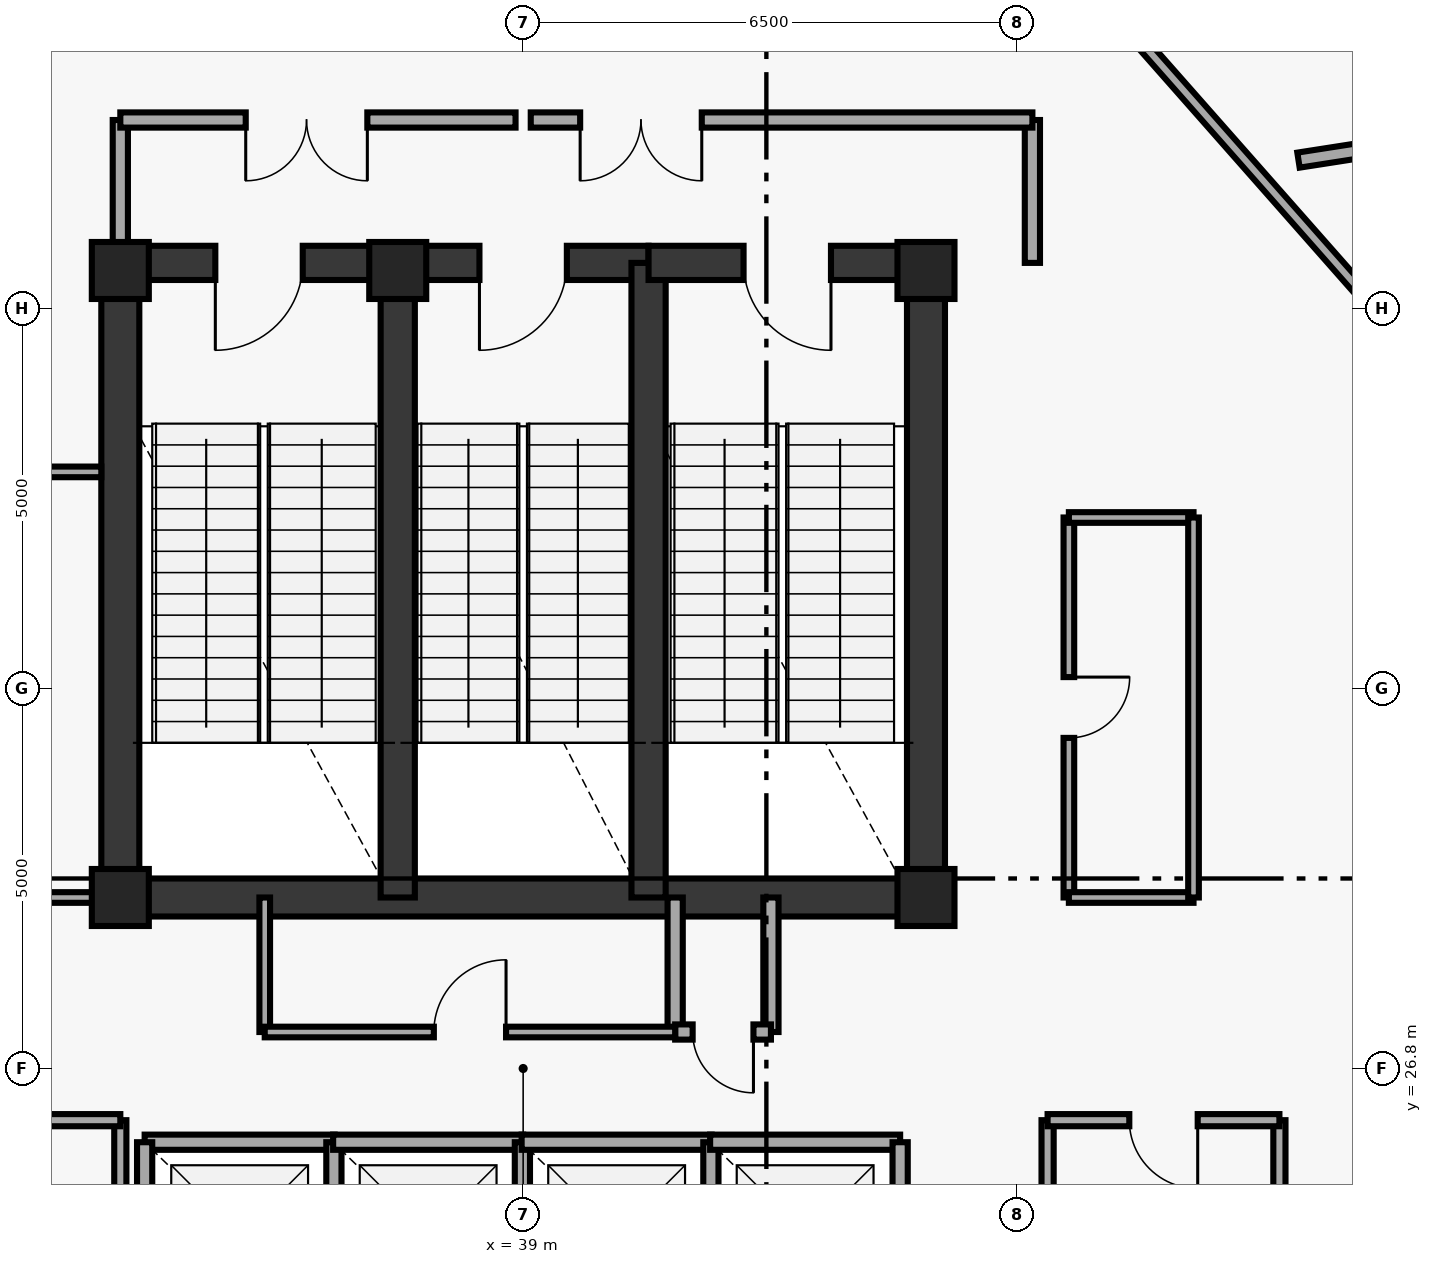
"""IFC4 building model, lengths in metres.
Left out: names, types, materials, properties, quantities, classifications, styles, units other than length and angle.
Written with IfcOpenShell. Run it as: python <this file> out.ifc"""

import sys

from ifc_helpers import new_model, si_unit, direction, frame, frame_2d, origin, origin_2d, place, context, subcontext, project, spatial, rectangle, extrude, element, fill, save


model = new_model("IFC4")
c1 = context("Model", 3, precision=1e-05, world=origin(), true_north=direction((0.0, 1.0)))
c2 = subcontext(c1, "Body", "Model", "MODEL_VIEW")
j1 = project(units=[si_unit("LENGTHUNIT", "METRE"), si_unit("PLANEANGLEUNIT", "RADIAN")], contexts=[c1])
p1 = place(None, origin())
s1 = spatial("IfcSite", under=j1, at=p1, CompositionType="ELEMENT")
p2 = place(p1, origin())
s2 = spatial("IfcBuilding", under=s1, at=p2, CompositionType="ELEMENT")
p3 = place(p2, frame((0.0, 0.0, 301.2)))
s3 = spatial("IfcBuildingStorey", under=s2, at=p3, CompositionType="ELEMENT", Elevation=301.2)
for number, where, z_axis, x_axis in (
    (1, (44.3, 29.05, 0.0), (0.0, 0.0, 1.0), (1.0, 0.0, 0.0)),
    (2, (44.3, 37.3, 0.0), (0.0, 0.0, 1.0), (1.0, 0.0, 0.0)),
    (3, (37.35, 37.3, 0.0), (0.0, 0.0, 1.0), (1.0, 0.0, 0.0)),
    (4, (33.7, 37.3, 0.0), (0.0, 0.0, 1.0), (1.0, 0.0, 0.0)),
    (5, (33.7, 29.05, 0.0), (0.0, 0.0, 1.0), (1.0, 0.0, 0.0)),
):
    element("IfcColumn", number, at=place(p3, frame(where, z_axis=z_axis, x_axis=x_axis)), inside=s3, PredefinedType="PILASTER", context=c2, shape_type="SweptSolid", body=[
        extrude(rectangle(XDim=0.75, YDim=0.75, at=origin_2d()), origin(), (0.0, 0.0, 1.0), 5.25),
    ])
for number, where, z_axis, x_axis in (
    (6, (33.7, 29.05, 0.0), (0.0, 0.0, 1.0), (0.0, 1.0, 0.0)),
    (7, (44.3, 29.05, 0.0), (0.0, 0.0, 1.0), (0.0, 1.0, 0.0)),
):
    element("IfcWall", number, at=place(p3, frame(where, z_axis=z_axis, x_axis=x_axis)), inside=s3, PredefinedType="SHEAR", context=c2, shape_type="SweptSolid", body=[
        extrude(rectangle(XDim=8.35, YDim=0.5, at=frame_2d((4.175, 0.0))), origin(), (0.0, 0.0, 1.0), 5.25),
    ])
p4 = place(p3, frame((33.7, 29.05, 0.0), z_axis=(0.0, 0.0, 1.0), x_axis=(1.0, 0.0, 0.0)))
e8 = element("IfcWall", 8, at=p4, inside=s3, PredefinedType="SHEAR", context=c2, shape_type="SweptSolid", body=[
    extrude(rectangle(XDim=10.6, YDim=0.5, at=frame_2d((5.3, 0.0))), origin(), (0.0, 0.0, 1.0), 5.25),
])
p5 = place(p3, frame((37.35, 37.4, 0.0), z_axis=(0.0, 0.0, 1.0), x_axis=(-1.0, 0.0, 0.0)))
e9 = element("IfcWall", 9, at=p5, inside=s3, PredefinedType="SHEAR", context=c2, shape_type="SweptSolid", body=[
    extrude(rectangle(XDim=3.65, YDim=0.45, at=frame_2d((1.825, 0.0))), origin(), (0.0, 0.0, 1.0), 5.25),
])
p6 = place(p5, frame((1.25, 0.0, 0.0)))
e10 = element("IfcOpeningElement", 10, at=p6, cuts=e9, PredefinedType="OPENING", context=c2, shape_type="SweptSolid", body=[
    extrude(rectangle(XDim=1.15, YDim=2.15, at=frame_2d((0.575, 1.075))), frame((0.0, 0.235, 0.0), z_axis=(0.0, -1.0, 0.0), x_axis=(1.0, 0.0, 0.0)), (0.0, 0.0, 1.0), 0.47),
])
p7 = place(p3, frame((37.35, 29.05, 0.0), z_axis=(0.0, 0.0, 1.0), x_axis=(0.0, 1.0, 0.0)))
e11 = element("IfcWall", 11, at=p7, inside=s3, PredefinedType="SHEAR", context=c2, shape_type="SweptSolid", body=[
    extrude(rectangle(XDim=8.35, YDim=0.45, at=frame_2d((4.175, 0.0))), origin(), (0.0, 0.0, 1.0), 5.25),
])
p8 = place(p3, frame((40.65, 37.4, 0.0), z_axis=(0.0, 0.0, 1.0), x_axis=(-1.0, 0.0, 0.0)))
e12 = element("IfcWall", 12, at=p8, inside=s3, PredefinedType="SHEAR", context=c2, shape_type="SweptSolid", body=[
    extrude(rectangle(XDim=3.3, YDim=0.45, at=frame_2d((1.65, 0.0))), origin(), (0.0, 0.0, 1.0), 5.25),
])
p9 = place(p8, frame((1.075, 0.0, 0.0)))
e13 = element("IfcOpeningElement", 13, at=p9, cuts=e12, PredefinedType="OPENING", context=c2, shape_type="SweptSolid", body=[
    extrude(rectangle(XDim=1.15, YDim=2.15, at=frame_2d((0.575, 1.075))), frame((0.0, 0.235, 0.0), z_axis=(0.0, -1.0, 0.0), x_axis=(1.0, 0.0, 0.0)), (0.0, 0.0, 1.0), 0.47),
])
p10 = place(p3, frame((40.65, 29.05, 0.0), z_axis=(0.0, 0.0, 1.0), x_axis=(0.0, 1.0, 0.0)))
e14 = element("IfcWall", 14, at=p10, inside=s3, PredefinedType="SHEAR", context=c2, shape_type="SweptSolid", body=[
    extrude(rectangle(XDim=8.35, YDim=0.45, at=frame_2d((4.175, 0.0))), origin(), (0.0, 0.0, 1.0), 5.25),
])
p11 = place(p3, frame((44.3, 37.4, 0.0), z_axis=(0.0, 0.0, 1.0), x_axis=(-1.0, 0.0, 0.0)))
e15 = element("IfcWall", 15, at=p11, inside=s3, PredefinedType="SHEAR", context=c2, shape_type="SweptSolid", body=[
    extrude(rectangle(XDim=3.65, YDim=0.45, at=frame_2d((1.825, 0.0))), origin(), (0.0, 0.0, 1.0), 5.25),
])
p12 = place(p11, frame((1.25, 0.0, 0.0)))
e16 = element("IfcOpeningElement", 16, at=p12, cuts=e15, PredefinedType="OPENING", context=c2, shape_type="SweptSolid", body=[
    extrude(rectangle(XDim=1.15, YDim=2.15, at=frame_2d((0.575, 1.075))), frame((0.0, 0.235, 0.0), z_axis=(0.0, -1.0, 0.0), x_axis=(1.0, 0.0, 0.0)), (0.0, 0.0, 1.0), 0.47),
])
for number, where, z_axis, x_axis in (
    (17, (33.7, 37.4, 0.0), (0.0, 0.0, 1.0), (0.0, 1.0, 0.0)),
    (18, (45.7, 37.4, 0.0), (0.0, 0.0, 1.0), (0.0, 1.0, 0.0)),
):
    element("IfcWall", number, at=place(p3, frame(where, z_axis=z_axis, x_axis=x_axis)), inside=s3, PredefinedType="SOLIDWALL", context=c2, shape_type="SweptSolid", body=[
        extrude(rectangle(XDim=1.88, YDim=0.2, at=frame_2d((0.94, 0.0))), origin(), (0.0, 0.0, 1.0), 5.25),
    ])
p13 = place(p3, frame((38.9, 39.28, 0.0), z_axis=(0.0, 0.0, 1.0), x_axis=(-1.0, 0.0, 0.0)))
e19 = element("IfcWall", 19, at=p13, inside=s3, PredefinedType="SOLIDWALL", context=c2, shape_type="SweptSolid", body=[
    extrude(rectangle(XDim=5.2, YDim=0.2, at=frame_2d((2.6, 0.0))), origin(), (0.0, 0.0, 1.0), 5.25),
])
p14 = place(p13, frame((1.95, 0.0, 0.0)))
e20 = element("IfcOpeningElement", 20, at=p14, cuts=e19, PredefinedType="OPENING", context=c2, shape_type="SweptSolid", body=[
    extrude(rectangle(XDim=1.6, YDim=2.2, at=frame_2d((0.8, 1.1))), frame((0.0, 0.11, 0.0), z_axis=(0.0, -1.0, 0.0), x_axis=(1.0, 0.0, 0.0)), (0.0, 0.0, 1.0), 0.22),
])
p15 = place(p3, frame((45.7, 39.28, 0.0), z_axis=(0.0, 0.0, 1.0), x_axis=(-1.0, 0.0, 0.0)))
e21 = element("IfcWall", 21, at=p15, inside=s3, PredefinedType="SOLIDWALL", context=c2, shape_type="SweptSolid", body=[
    extrude(rectangle(XDim=6.6, YDim=0.2, at=frame_2d((3.3, 0.0))), origin(), (0.0, 0.0, 1.0), 5.25),
])
p16 = place(p15, frame((4.35, 0.0, 0.0)))
e22 = element("IfcOpeningElement", 22, at=p16, cuts=e21, PredefinedType="OPENING", context=c2, shape_type="SweptSolid", body=[
    extrude(rectangle(XDim=1.6, YDim=2.2, at=frame_2d((0.8, 1.1))), frame((0.0, 0.11, 0.0), z_axis=(0.0, -1.0, 0.0), x_axis=(1.0, 0.0, 0.0)), (0.0, 0.0, 1.0), 0.22),
])
p17 = place(p3, frame((35.6, 27.28, 0.0), z_axis=(0.0, 0.0, 1.0), x_axis=(0.0, 1.0, 0.0)))
e23 = element("IfcWall", 23, at=p17, inside=s3, PredefinedType="PARTITIONING", context=c2, shape_type="SweptSolid", body=[
    extrude(rectangle(XDim=1.77, YDim=0.14, at=frame_2d((0.885, 0.0))), origin(), (0.0, 0.0, 1.0), 5.25),
])
for number, where, z_axis, x_axis in (
    (24, (41.0, 27.28, 0.0), (0.0, 0.0, 1.0), (0.0, 1.0, 0.0)),
    (25, (42.26, 27.28, 0.0), (0.0, 0.0, 1.0), (0.0, 1.0, 0.0)),
):
    element("IfcWall", number, at=place(p3, frame(where, z_axis=z_axis, x_axis=x_axis)), inside=s3, PredefinedType="SOLIDWALL", context=c2, shape_type="SweptSolid", body=[
        extrude(rectangle(XDim=1.77, YDim=0.2, at=frame_2d((0.885, 0.0))), origin(), (0.0, 0.0, 1.0), 5.25),
    ])
p18 = place(p3, frame((41.0, 27.28, 0.0), z_axis=(0.0, 0.0, 1.0), x_axis=(1.0, 0.0, 0.0)))
e26 = element("IfcWall", 26, at=p18, inside=s3, PredefinedType="SOLIDWALL", context=c2, shape_type="SweptSolid", body=[
    extrude(rectangle(XDim=1.26, YDim=0.2, at=frame_2d((0.63, 0.0))), origin(), (0.0, 0.0, 1.0), 5.25),
])
p19 = place(p18, frame((0.23, 0.0, 0.0)))
e27 = element("IfcOpeningElement", 27, at=p19, cuts=e26, PredefinedType="OPENING", context=c2, shape_type="SweptSolid", body=[
    extrude(rectangle(XDim=0.8, YDim=2.05, at=frame_2d((0.4, 1.025))), frame((0.0, 0.11, 0.0), z_axis=(0.0, -1.0, 0.0), x_axis=(1.0, 0.0, 0.0)), (0.0, 0.0, 1.0), 0.22),
])
p20 = place(p3, frame((34.02, 25.83, 0.0), z_axis=(0.0, 0.0, 1.0), x_axis=(1.0, 0.0, 0.0)))
e28 = element("IfcWall", 28, at=p20, inside=s3, PredefinedType="SOLIDWALL", context=c2, shape_type="SweptSolid", body=[
    extrude(rectangle(XDim=2.5, YDim=0.2, at=frame_2d((1.25, 0.0))), origin(), (0.0, 0.0, 1.0), 5.25),
])
for number, where, z_axis, x_axis in (
    (29, (34.02, 23.42, 0.0), (0.0, 0.0, 1.0), (0.0, 1.0, 0.0)),
    (30, (36.51, 23.42, 0.0), (0.0, 0.0, 1.0), (0.0, 1.0, 0.0)),
):
    element("IfcWall", number, at=place(p3, frame(where, z_axis=z_axis, x_axis=x_axis)), inside=s3, PredefinedType="SOLIDWALL", context=c2, shape_type="SweptSolid", body=[
        extrude(rectangle(XDim=2.41, YDim=0.2, at=frame_2d((1.205, 0.0))), origin(), (0.0, 0.0, 1.0), 5.25),
    ])
p21 = place(p3, frame((36.5, 25.83, 0.0), z_axis=(0.0, 0.0, 1.0), x_axis=(1.0, 0.0, 0.0)))
e31 = element("IfcWall", 31, at=p21, inside=s3, PredefinedType="SOLIDWALL", context=c2, shape_type="SweptSolid", body=[
    extrude(rectangle(XDim=2.5, YDim=0.2, at=frame_2d((1.25, 0.0))), origin(), (0.0, 0.0, 1.0), 5.25),
])
p22 = place(p3, frame((38.99, 23.42, 0.0), z_axis=(0.0, 0.0, 1.0), x_axis=(0.0, 1.0, 0.0)))
e32 = element("IfcWall", 32, at=p22, inside=s3, PredefinedType="SOLIDWALL", context=c2, shape_type="SweptSolid", body=[
    extrude(rectangle(XDim=2.41, YDim=0.2, at=frame_2d((1.205, 0.0))), origin(), (0.0, 0.0, 1.0), 5.25),
])
p23 = place(p3, frame((38.98, 25.83, 0.0), z_axis=(0.0, 0.0, 1.0), x_axis=(1.0, 0.0, 0.0)))
e33 = element("IfcWall", 33, at=p23, inside=s3, PredefinedType="SOLIDWALL", context=c2, shape_type="SweptSolid", body=[
    extrude(rectangle(XDim=2.5, YDim=0.2, at=frame_2d((1.25, 0.0))), origin(), (0.0, 0.0, 1.0), 5.25),
])
p24 = place(p3, frame((41.47, 23.42, 0.0), z_axis=(0.0, 0.0, 1.0), x_axis=(0.0, 1.0, 0.0)))
e34 = element("IfcWall", 34, at=p24, inside=s3, PredefinedType="SOLIDWALL", context=c2, shape_type="SweptSolid", body=[
    extrude(rectangle(XDim=2.41, YDim=0.2, at=frame_2d((1.205, 0.0))), origin(), (0.0, 0.0, 1.0), 5.25),
])
p25 = place(p3, frame((41.46, 25.83, 0.0), z_axis=(0.0, 0.0, 1.0), x_axis=(1.0, 0.0, 0.0)))
e35 = element("IfcWall", 35, at=p25, inside=s3, PredefinedType="SOLIDWALL", context=c2, shape_type="SweptSolid", body=[
    extrude(rectangle(XDim=2.5, YDim=0.2, at=frame_2d((1.25, 0.0))), origin(), (0.0, 0.0, 1.0), 5.25),
])
p26 = place(p3, frame((43.96, 23.42, 0.0), z_axis=(0.0, 0.0, 1.0), x_axis=(0.0, 1.0, 0.0)))
e36 = element("IfcWall", 36, at=p26, inside=s3, PredefinedType="SOLIDWALL", context=c2, shape_type="SweptSolid", body=[
    extrude(rectangle(XDim=2.41, YDim=0.2, at=frame_2d((1.205, 0.0))), origin(), (0.0, 0.0, 1.0), 5.25),
])
p27 = place(p3, frame((33.7, 23.45, 0.0), z_axis=(0.0, 0.0, 1.0), x_axis=(0.0, 1.0, 0.0)))
e37 = element("IfcWall", 37, at=p27, inside=s3, PredefinedType="PARTITIONING", context=c2, shape_type="SweptSolid", body=[
    extrude(rectangle(XDim=2.67, YDim=0.16, at=frame_2d((1.335, 0.0))), origin(), (0.0, 0.0, 1.0), 4.635),
])
p28 = place(p3, frame((33.7, 26.12, 0.0), z_axis=(0.0, 0.0, 1.0), x_axis=(-1.0, 0.0, 0.0)))
e38 = element("IfcWall", 38, at=p28, inside=s3, PredefinedType="PARTITIONING", context=c2, shape_type="SweptSolid", body=[
    extrude(rectangle(XDim=4.65, YDim=0.16, at=frame_2d((2.325, 0.0))), origin(), (0.0, 0.0, 1.0), 5.25),
])
p29 = place(p28, frame((1.875, 0.0, 0.0)))
e39 = element("IfcOpeningElement", 39, at=p29, cuts=e38, PredefinedType="OPENING", context=c2, shape_type="SweptSolid", body=[
    extrude(rectangle(XDim=0.9, YDim=2.1, at=frame_2d((0.45, 1.05))), frame((0.0, 0.09, 0.0), z_axis=(0.0, -1.0, 0.0), x_axis=(1.0, 0.0, 0.0)), (0.0, 0.0, 1.0), 0.18),
])
for number, where, z_axis, x_axis in (
    (40, (48.95, 19.05, 0.0), (0.0, 0.0, 1.0), (0.0, 1.0, 0.0)),
    (41, (45.9, 19.05, 0.0), (0.0, 0.0, 1.0), (0.0, 1.0, 0.0)),
):
    element("IfcWall", number, at=place(p3, frame(where, z_axis=z_axis, x_axis=x_axis)), inside=s3, PredefinedType="PARTITIONING", context=c2, shape_type="SweptSolid", body=[
        extrude(rectangle(XDim=7.07, YDim=0.16, at=frame_2d((3.535, 0.0))), origin(), (0.0, 0.0, 1.0), 5.25),
    ])
p30 = place(p3, frame((48.95, 26.12, 0.0), z_axis=(0.0, 0.0, 1.0), x_axis=(-1.0, 0.0, 0.0)))
e42 = element("IfcWall", 42, at=p30, inside=s3, PredefinedType="PARTITIONING", context=c2, shape_type="SweptSolid", body=[
    extrude(rectangle(XDim=3.05, YDim=0.16, at=frame_2d((1.525, 0.0))), origin(), (0.0, 0.0, 1.0), 5.25),
])
p31 = place(p30, frame((1.075, 0.0, 0.0)))
e43 = element("IfcOpeningElement", 43, at=p31, cuts=e42, PredefinedType="OPENING", context=c2, shape_type="SweptSolid", body=[
    extrude(rectangle(XDim=0.9, YDim=2.1, at=frame_2d((0.45, 1.05))), frame((0.0, 0.09, 0.0), z_axis=(0.0, -1.0, 0.0), x_axis=(1.0, 0.0, 0.0)), (0.0, 0.0, 1.0), 0.18),
])
p32 = place(p3, frame((35.6, 27.28, 0.0), z_axis=(0.0, 0.0, 1.0), x_axis=(1.0, 0.0, 0.0)))
e44 = element("IfcWall", 44, at=p32, inside=s3, PredefinedType="PARTITIONING", context=c2, shape_type="SweptSolid", body=[
    extrude(rectangle(XDim=5.4, YDim=0.14, at=frame_2d((2.7, 0.0))), origin(), (0.0, 0.0, 1.0), 5.25),
])
p33 = place(p32, frame((2.225, 0.0, 0.0)))
e45 = element("IfcOpeningElement", 45, at=p33, cuts=e44, PredefinedType="OPENING", context=c2, shape_type="SweptSolid", body=[
    extrude(rectangle(XDim=0.95, YDim=2.1, at=frame_2d((0.475, 1.05))), frame((0.0, 0.08, 0.0), z_axis=(0.0, -1.0, 0.0), x_axis=(1.0, 0.0, 0.0)), (0.0, 0.0, 1.0), 0.16),
])
p34 = place(p3, frame((31.584, 29.05, 0.0), z_axis=(0.0, 0.0, 1.0), x_axis=(1.0, 0.0, 0.0)))
e46 = element("IfcWall", 46, at=p34, inside=s3, PredefinedType="PARTITIONING", context=c2, shape_type="SweptSolid", body=[
    extrude(rectangle(XDim=1.866, YDim=0.14, at=frame_2d((0.933, 0.0))), origin(), (0.0, 0.0, 1.0), 3.45),
])
p35 = place(p34, frame((0.166, 0.0, 0.0)))
e47 = element("IfcOpeningElement", 47, at=p35, cuts=e46, PredefinedType="OPENING", context=c2, shape_type="SweptSolid", body=[
    extrude(rectangle(XDim=0.8, YDim=2.05, at=frame_2d((0.4, 1.025))), frame((0.0, 0.08, 0.0), z_axis=(0.0, -1.0, 0.0), x_axis=(1.0, 0.0, 0.0)), (0.0, 0.0, 1.0), 0.16),
])
p36 = place(p3, frame((30.85, 34.65, 0.0), z_axis=(0.0, 0.0, 1.0), x_axis=(1.0, 0.0, 0.0)))
e48 = element("IfcWall", 48, at=p36, inside=s3, PredefinedType="PARTITIONING", context=c2, shape_type="SweptSolid", body=[
    extrude(rectangle(XDim=2.6, YDim=0.14, at=frame_2d((1.3, 0.0))), origin(), (0.0, 0.0, 1.0), 5.25),
])
p37 = place(p3, frame((46.18, 34.05, 0.0), z_axis=(0.0, 0.0, 1.0), x_axis=(0.0, -1.0, 0.0)))
e49 = element("IfcWall", 49, at=p37, inside=s3, PredefinedType="PARTITIONING", context=c2, shape_type="SweptSolid", body=[
    extrude(rectangle(XDim=5.0, YDim=0.14, at=frame_2d((2.5, 0.0))), origin(), (0.0, 0.0, 1.0), 5.25),
])
p38 = place(p37, frame((2.1, 0.0, 0.0)))
e50 = element("IfcOpeningElement", 50, at=p38, cuts=e49, PredefinedType="OPENING", context=c2, shape_type="SweptSolid", body=[
    extrude(rectangle(XDim=0.8, YDim=2.05, at=frame_2d((0.4, 1.025))), frame((0.0, 0.08, 0.0), z_axis=(0.0, -1.0, 0.0), x_axis=(1.0, 0.0, 0.0)), (0.0, 0.0, 1.0), 0.16),
])
for number, where, z_axis, x_axis in (
    (51, (46.18, 29.05, 0.0), (0.0, 0.0, 1.0), (1.0, 0.0, 0.0)),
    (52, (46.18, 34.05, 0.0), (0.0, 0.0, 1.0), (1.0, 0.0, 0.0)),
):
    element("IfcWall", number, at=place(p3, frame(where, z_axis=z_axis, x_axis=x_axis)), inside=s3, PredefinedType="PARTITIONING", context=c2, shape_type="SweptSolid", body=[
        extrude(rectangle(XDim=1.64, YDim=0.14, at=frame_2d((0.82, 0.0))), origin(), (0.0, 0.0, 1.0), 5.25),
    ])
p39 = place(p3, frame((47.82, 29.05, 0.0), z_axis=(0.0, 0.0, 1.0), x_axis=(0.0, 1.0, 0.0)))
e53 = element("IfcWall", 53, at=p39, inside=s3, PredefinedType="PARTITIONING", context=c2, shape_type="SweptSolid", body=[
    extrude(rectangle(XDim=5.0, YDim=0.14, at=frame_2d((2.5, 0.0))), origin(), (0.0, 0.0, 1.0), 5.25),
])
p40 = place(p3, frame((51.552, 35.291, 0.0), z_axis=(0.0, 0.0, 1.0), x_axis=(-0.661421630005, 0.750014284772, 0.0)))
e54 = element("IfcWall", 54, at=p40, inside=s3, PredefinedType="PARTITIONING", context=c2, shape_type="SweptSolid", body=[
    extrude(rectangle(XDim=8.116, YDim=0.16, at=frame_2d((4.058, 0.0))), origin(), (0.0, 0.0, 1.0), 5.25),
])
p41 = place(p3, frame((49.201, 38.752, 0.0), z_axis=(0.0, 0.0, 1.0), x_axis=(0.988090587407, 0.153873295533, 0.0)))
e55 = element("IfcWall", 55, at=p41, inside=s3, PredefinedType="SOLIDWALL", context=c2, shape_type="SweptSolid", body=[
    extrude(rectangle(XDim=4.555, YDim=0.2, at=frame_2d((2.278, 0.0))), origin(), (0.0, 0.0, 1.0), 5.25),
])
p42 = place(p6, origin())
e56 = element("IfcDoor", 56, at=p42, inside=s3, OperationType="SINGLE_SWING_RIGHT", PredefinedType="DOOR", context=c2, shape_type="SweptSolid", body=[
    extrude(rectangle(XDim=1.15, YDim=2.15, at=frame_2d((0.575, 1.075))), frame((0.0, 0.025, 0.0), z_axis=(0.0, -1.0, 0.0), x_axis=(1.0, 0.0, 0.0)), (0.0, 0.0, 1.0), 0.05),
])
fill(e10, e56)
p43 = place(p9, origin())
e57 = element("IfcDoor", 57, at=p43, inside=s3, OperationType="SINGLE_SWING_RIGHT", PredefinedType="DOOR", context=c2, shape_type="SweptSolid", body=[
    extrude(rectangle(XDim=1.15, YDim=2.15, at=frame_2d((0.575, 1.075))), frame((0.0, 0.025, 0.0), z_axis=(0.0, -1.0, 0.0), x_axis=(1.0, 0.0, 0.0)), (0.0, 0.0, 1.0), 0.05),
])
fill(e13, e57)
p44 = place(p12, origin())
e58 = element("IfcDoor", 58, at=p44, inside=s3, OperationType="SINGLE_SWING_LEFT", PredefinedType="DOOR", context=c2, shape_type="SweptSolid", body=[
    extrude(rectangle(XDim=1.15, YDim=2.15, at=frame_2d((0.575, 1.075))), frame((0.0, 0.025, 0.0), z_axis=(0.0, -1.0, 0.0), x_axis=(1.0, 0.0, 0.0)), (0.0, 0.0, 1.0), 0.05),
])
fill(e16, e58)
p45 = place(p14, origin())
e59 = element("IfcDoor", 59, at=p45, inside=s3, OperationType="DOUBLE_DOOR_SINGLE_SWING", PredefinedType="DOOR", context=c2, shape_type="SweptSolid", body=[
    extrude(rectangle(XDim=1.6, YDim=2.2, at=frame_2d((0.8, 1.1))), frame((0.0, 0.025, 0.0), z_axis=(0.0, -1.0, 0.0), x_axis=(1.0, 0.0, 0.0)), (0.0, 0.0, 1.0), 0.05),
])
fill(e20, e59)
p46 = place(p16, origin())
e60 = element("IfcDoor", 60, at=p46, inside=s3, OperationType="DOUBLE_DOOR_SINGLE_SWING", PredefinedType="DOOR", context=c2, shape_type="SweptSolid", body=[
    extrude(rectangle(XDim=1.6, YDim=2.2, at=frame_2d((0.8, 1.1))), frame((0.0, 0.025, 0.0), z_axis=(0.0, -1.0, 0.0), x_axis=(1.0, 0.0, 0.0)), (0.0, 0.0, 1.0), 0.05),
])
fill(e22, e60)
p47 = place(p19, origin())
e61 = element("IfcDoor", 61, at=p47, inside=s3, OperationType="SINGLE_SWING_RIGHT", PredefinedType="DOOR", context=c2, shape_type="SweptSolid", body=[
    extrude(rectangle(XDim=0.8, YDim=2.05, at=frame_2d((0.4, 1.025))), frame((0.0, 0.025, 0.0), z_axis=(0.0, -1.0, 0.0), x_axis=(1.0, 0.0, 0.0)), (0.0, 0.0, 1.0), 0.05),
])
fill(e27, e61)
p48 = place(p31, origin())
e62 = element("IfcDoor", 62, at=p48, inside=s3, OperationType="SINGLE_SWING_LEFT", PredefinedType="DOOR", context=c2, shape_type="SweptSolid", body=[
    extrude(rectangle(XDim=0.9, YDim=2.1, at=frame_2d((0.45, 1.05))), frame((0.0, 0.025, 0.0), z_axis=(0.0, -1.0, 0.0), x_axis=(1.0, 0.0, 0.0)), (0.0, 0.0, 1.0), 0.05),
])
fill(e43, e62)
p49 = place(p33, origin())
e63 = element("IfcDoor", 63, at=p49, inside=s3, OperationType="SINGLE_SWING_RIGHT", PredefinedType="DOOR", context=c2, shape_type="SweptSolid", body=[
    extrude(rectangle(XDim=0.95, YDim=2.1, at=frame_2d((0.475, 1.05))), frame((0.0, 0.025, 0.0), z_axis=(0.0, -1.0, 0.0), x_axis=(1.0, 0.0, 0.0)), (0.0, 0.0, 1.0), 0.05),
])
fill(e45, e63)
p50 = place(p38, origin())
e64 = element("IfcDoor", 64, at=p50, inside=s3, OperationType="SINGLE_SWING_LEFT", PredefinedType="DOOR", context=c2, shape_type="SweptSolid", body=[
    extrude(rectangle(XDim=0.8, YDim=2.05, at=frame_2d((0.4, 1.025))), frame((0.0, 0.025, 0.0), z_axis=(0.0, -1.0, 0.0), x_axis=(1.0, 0.0, 0.0)), (0.0, 0.0, 1.0), 0.05),
])
fill(e50, e64)
save(model, sys.argv[1])
